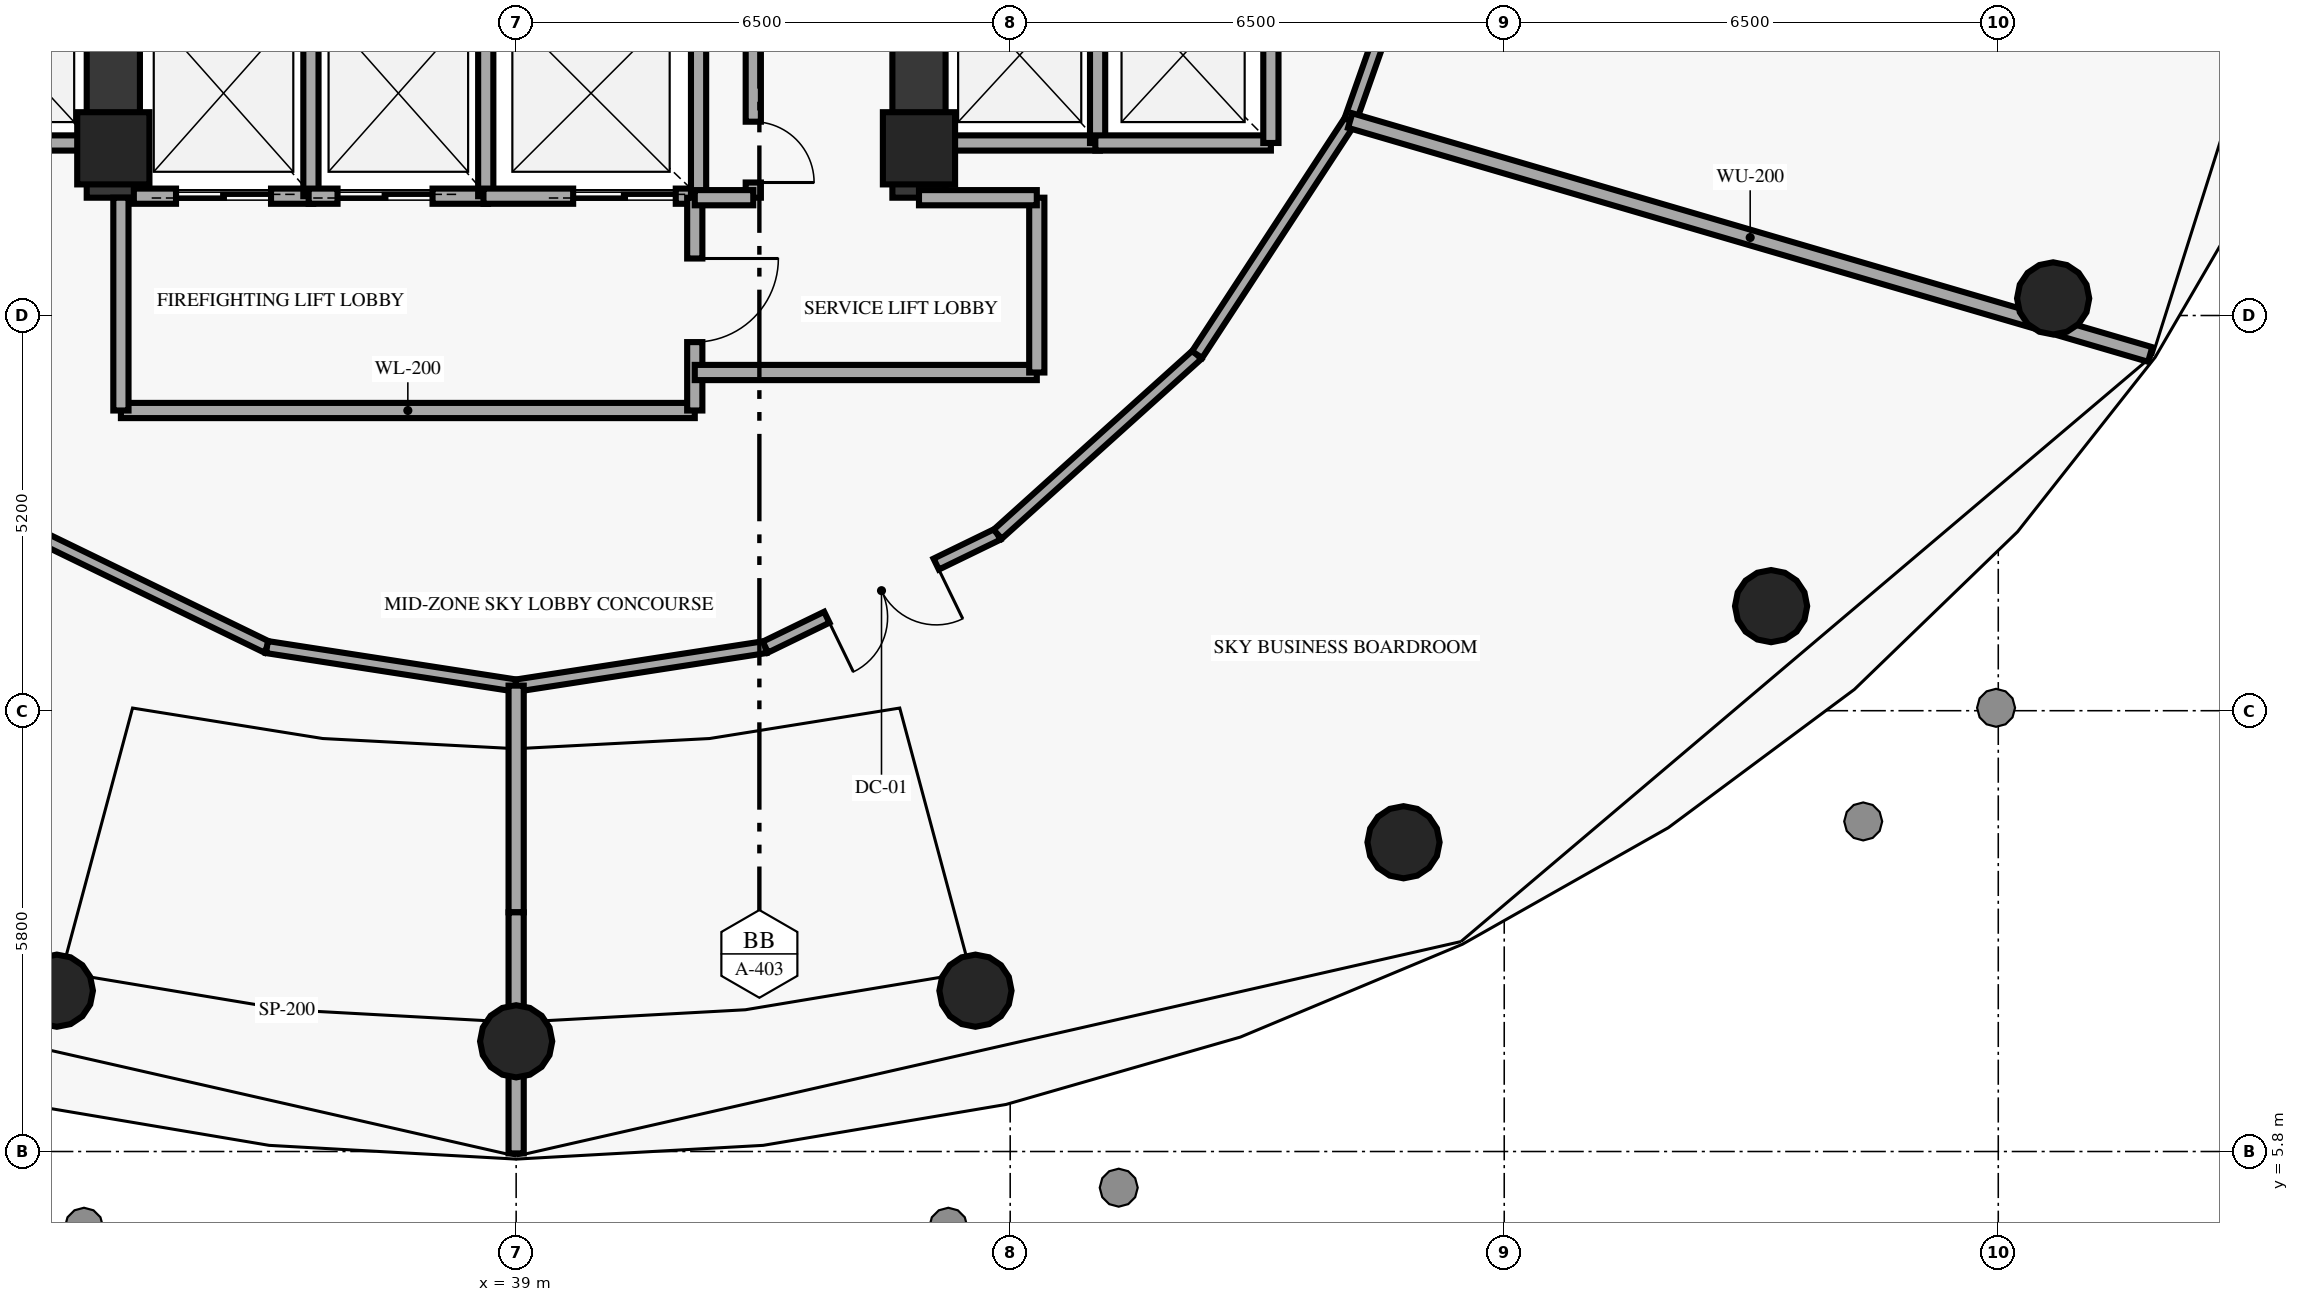
"""IFC4 building model, lengths in metres.
Left out: names, types, materials, properties, quantities, classifications, styles, units other than length and angle.
Written with IfcOpenShell. Run it as: python <this file> out.ifc"""

import sys

from ifc_helpers import new_model, si_unit, direction, frame, frame_2d, origin, origin_2d, place, context, subcontext, project, spatial, rectangle, circle, extrude, element, fill, save


model = new_model("IFC4")
c1 = context("Model", 3, precision=1e-05, world=origin(), true_north=direction((0.0, 1.0)))
c2 = subcontext(c1, "Body", "Model", "MODEL_VIEW")
j1 = project(units=[si_unit("LENGTHUNIT", "METRE"), si_unit("PLANEANGLEUNIT", "RADIAN")], contexts=[c1])
p1 = place(None, origin())
s1 = spatial("IfcSite", under=j1, at=p1, CompositionType="ELEMENT")
p2 = place(p1, origin())
s2 = spatial("IfcBuilding", under=s1, at=p2, CompositionType="ELEMENT")
p3 = place(p2, frame((0.0, 0.0, 113.25)))
s3 = spatial("IfcBuildingStorey", under=s2, at=p3, CompositionType="ELEMENT", Elevation=113.25)
for number, where, z_axis, x_axis in (
    (1, (33.7, 19.0, 0.0), (0.0, 0.0, 1.0), (1.0, 0.0, 0.0)),
    (2, (44.3, 19.0, 0.0), (0.0, 0.0, 1.0), (1.0, 0.0, 0.0)),
):
    element("IfcColumn", number, at=place(p3, frame(where, z_axis=z_axis, x_axis=x_axis)), inside=s3, PredefinedType="PILASTER", context=c2, shape_type="SweptSolid", body=[
        extrude(rectangle(XDim=0.95, YDim=0.95, at=origin_2d()), origin(), (0.0, 0.0, 1.0), 4.75),
    ])
for number, where, z_axis, x_axis in (
    (3, (32.957, 7.916, 0.0), (0.0, 0.0, 1.0), (1.0, 0.0, 0.0)),
    (4, (39.0, 7.25, 0.0), (0.0, 0.0, 1.0), (1.0, 0.0, 0.0)),
    (5, (45.043, 7.916, 0.0), (0.0, 0.0, 1.0), (1.0, 0.0, 0.0)),
    (6, (50.675, 9.869, 0.0), (0.0, 0.0, 1.0), (1.0, 0.0, 0.0)),
    (7, (55.511, 12.976, 0.0), (0.0, 0.0, 1.0), (1.0, 0.0, 0.0)),
    (8, (59.222, 17.025, 0.0), (0.0, 0.0, 1.0), (1.0, 0.0, 0.0)),
):
    element("IfcColumn", number, at=place(p3, frame(where, z_axis=z_axis, x_axis=x_axis)), inside=s3, PredefinedType="COLUMN", context=c2, shape_type="SweptSolid", body=[
        extrude(circle(Radius=0.475, at=origin_2d()), origin(), (0.0, 0.0, 1.0), 4.75),
    ])
for number, where, z_axis, x_axis in (
    (9, (33.7, 18.35, 0.0), (0.0, 0.0, 1.0), (0.0, 1.0, 0.0)),
    (10, (44.3, 18.35, 0.0), (0.0, 0.0, 1.0), (0.0, 1.0, 0.0)),
):
    element("IfcWall", number, at=place(p3, frame(where, z_axis=z_axis, x_axis=x_axis)), inside=s3, PredefinedType="SHEAR", context=c2, shape_type="SweptSolid", body=[
        extrude(rectangle(XDim=2.95, YDim=0.7, at=frame_2d((1.475, 0.0))), origin(), (0.0, 0.0, 1.0), 4.75),
    ])
for number, where, z_axis, x_axis in (
    (11, (31.32, 19.07, 0.0), (0.0, 0.0, 1.0), (1.0, 0.0, 0.0)),
    (12, (44.57, 19.07, 0.0), (0.0, 0.0, 1.0), (1.0, 0.0, 0.0)),
):
    element("IfcWall", number, at=place(p3, frame(where, z_axis=z_axis, x_axis=x_axis)), inside=s3, PredefinedType="SOLIDWALL", context=c2, shape_type="SweptSolid", body=[
        extrude(rectangle(XDim=2.11, YDim=0.2, at=frame_2d((1.055, 0.0))), origin(), (0.0, 0.0, 1.0), 4.75),
    ])
for number, where, z_axis, x_axis in (
    (13, (46.65, 19.07, 0.0), (0.0, 0.0, 1.0), (0.0, 1.0, 0.0)),
    (14, (46.62, 19.07, 0.0), (0.0, 0.0, 1.0), (1.0, 0.0, 0.0)),
    (15, (48.93, 19.07, 0.0), (0.0, 0.0, 1.0), (0.0, 1.0, 0.0)),
):
    element("IfcWall", number, at=place(p3, frame(where, z_axis=z_axis, x_axis=x_axis)), inside=s3, PredefinedType="SOLIDWALL", context=c2, shape_type="SweptSolid", body=[
        extrude(rectangle(XDim=2.31, YDim=0.2, at=frame_2d((1.155, 0.0))), origin(), (0.0, 0.0, 1.0), 4.75),
    ])
p4 = place(p3, frame((33.97, 18.37, 0.0), z_axis=(0.0, 0.0, 1.0), x_axis=(1.0, 0.0, 0.0)))
e16 = element("IfcWall", 16, at=p4, inside=s3, PredefinedType="SOLIDWALL", context=c2, shape_type="SweptSolid", body=[
    extrude(rectangle(XDim=2.36, YDim=0.2, at=frame_2d((1.18, 0.0))), origin(), (0.0, 0.0, 1.0), 4.75),
])
p5 = place(p4, frame((0.555, 0.0, 0.0)))
e17 = element("IfcOpeningElement", 17, at=p5, cuts=e16, PredefinedType="OPENING", context=c2, shape_type="SweptSolid", body=[
    extrude(rectangle(XDim=1.25, YDim=2.2, at=frame_2d((0.625, 1.1))), frame((0.0, 0.11, 0.0), z_axis=(0.0, -1.0, 0.0), x_axis=(1.0, 0.0, 0.0)), (0.0, 0.0, 1.0), 0.22),
])
p6 = place(p3, frame((36.3, 18.37, 0.0), z_axis=(0.0, 0.0, 1.0), x_axis=(0.0, 1.0, 0.0)))
e18 = element("IfcWall", 18, at=p6, inside=s3, PredefinedType="SOLIDWALL", context=c2, shape_type="SweptSolid", body=[
    extrude(rectangle(XDim=2.71, YDim=0.2, at=frame_2d((1.355, 0.0))), origin(), (0.0, 0.0, 1.0), 4.75),
])
p7 = place(p3, frame((36.27, 18.37, 0.0), z_axis=(0.0, 0.0, 1.0), x_axis=(1.0, 0.0, 0.0)))
e19 = element("IfcWall", 19, at=p7, inside=s3, PredefinedType="SOLIDWALL", context=c2, shape_type="SweptSolid", body=[
    extrude(rectangle(XDim=2.36, YDim=0.2, at=frame_2d((1.18, 0.0))), origin(), (0.0, 0.0, 1.0), 4.75),
])
p8 = place(p7, frame((0.38, 0.0, 0.0)))
e20 = element("IfcOpeningElement", 20, at=p8, cuts=e19, PredefinedType="OPENING", context=c2, shape_type="SweptSolid", body=[
    extrude(rectangle(XDim=1.25, YDim=2.2, at=frame_2d((0.625, 1.1))), frame((0.0, 0.11, 0.0), z_axis=(0.0, -1.0, 0.0), x_axis=(1.0, 0.0, 0.0)), (0.0, 0.0, 1.0), 0.22),
])
p9 = place(p3, frame((38.6, 18.37, 0.0), z_axis=(0.0, 0.0, 1.0), x_axis=(0.0, 1.0, 0.0)))
e21 = element("IfcWall", 21, at=p9, inside=s3, PredefinedType="SOLIDWALL", context=c2, shape_type="SweptSolid", body=[
    extrude(rectangle(XDim=2.71, YDim=0.2, at=frame_2d((1.355, 0.0))), origin(), (0.0, 0.0, 1.0), 4.75),
])
p10 = place(p3, frame((38.57, 18.37, 0.0), z_axis=(0.0, 0.0, 1.0), x_axis=(1.0, 0.0, 0.0)))
e22 = element("IfcWall", 22, at=p10, inside=s3, PredefinedType="SOLIDWALL", context=c2, shape_type="SweptSolid", body=[
    extrude(rectangle(XDim=2.83, YDim=0.2, at=frame_2d((1.415, 0.0))), origin(), (0.0, 0.0, 1.0), 4.75),
])
p11 = place(p10, frame((1.18, 0.0, 0.0)))
e23 = element("IfcOpeningElement", 23, at=p11, cuts=e22, PredefinedType="OPENING", context=c2, shape_type="SweptSolid", body=[
    extrude(rectangle(XDim=1.35, YDim=2.18, at=frame_2d((0.675, 1.09))), frame((0.0, 0.11, 0.0), z_axis=(0.0, -1.0, 0.0), x_axis=(1.0, 0.0, 0.0)), (0.0, 0.0, 1.0), 0.22),
])
p12 = place(p3, frame((41.4, 18.37, 0.0), z_axis=(0.0, 0.0, 1.0), x_axis=(0.0, 1.0, 0.0)))
e24 = element("IfcWall", 24, at=p12, inside=s3, PredefinedType="SOLIDWALL", context=c2, shape_type="SweptSolid", body=[
    extrude(rectangle(XDim=2.71, YDim=0.2, at=frame_2d((1.355, 0.0))), origin(), (0.0, 0.0, 1.0), 4.75),
])
p13 = place(p3, frame((33.8, 15.55, 0.0), z_axis=(0.0, 0.0, 1.0), x_axis=(1.0, 0.0, 0.0)))
e25 = element("IfcWall", 25, at=p13, inside=s3, PredefinedType="SOLIDWALL", context=c2, shape_type="SweptSolid", body=[
    extrude(rectangle(XDim=7.55, YDim=0.2, at=frame_2d((3.775, 0.0))), origin(), (0.0, 0.0, 1.0), 4.75),
])
p14 = place(p3, frame((33.8, 15.55, 0.0), z_axis=(0.0, 0.0, 1.0), x_axis=(0.0, 1.0, 0.0)))
e26 = element("IfcWall", 26, at=p14, inside=s3, PredefinedType="SOLIDWALL", context=c2, shape_type="SweptSolid", body=[
    extrude(rectangle(XDim=2.8, YDim=0.2, at=frame_2d((1.4, 0.0))), origin(), (0.0, 0.0, 1.0), 4.75),
])
p15 = place(p3, frame((41.35, 15.55, 0.0), z_axis=(0.0, 0.0, 1.0), x_axis=(0.0, 1.0, 0.0)))
e27 = element("IfcWall", 27, at=p15, inside=s3, PredefinedType="SOLIDWALL", context=c2, shape_type="SweptSolid", body=[
    extrude(rectangle(XDim=2.8, YDim=0.2, at=frame_2d((1.4, 0.0))), origin(), (0.0, 0.0, 1.0), 4.75),
])
p16 = place(p15, frame((0.9, 0.0, 0.0)))
e28 = element("IfcOpeningElement", 28, at=p16, cuts=e27, PredefinedType="OPENING", context=c2, shape_type="SweptSolid", body=[
    extrude(rectangle(XDim=1.1, YDim=2.15, at=frame_2d((0.55, 1.075))), frame((0.0, 0.11, 0.0), z_axis=(0.0, -1.0, 0.0), x_axis=(1.0, 0.0, 0.0)), (0.0, 0.0, 1.0), 0.22),
])
p17 = place(p3, frame((41.35, 16.05, 0.0), z_axis=(0.0, 0.0, 1.0), x_axis=(1.0, 0.0, 0.0)))
e29 = element("IfcWall", 29, at=p17, inside=s3, PredefinedType="SOLIDWALL", context=c2, shape_type="SweptSolid", body=[
    extrude(rectangle(XDim=4.5, YDim=0.2, at=frame_2d((2.25, 0.0))), origin(), (0.0, 0.0, 1.0), 4.75),
])
p18 = place(p3, frame((45.85, 16.05, 0.0), z_axis=(0.0, 0.0, 1.0), x_axis=(0.0, 1.0, 0.0)))
e30 = element("IfcWall", 30, at=p18, inside=s3, PredefinedType="SOLIDWALL", context=c2, shape_type="SweptSolid", body=[
    extrude(rectangle(XDim=2.3, YDim=0.2, at=frame_2d((1.15, 0.0))), origin(), (0.0, 0.0, 1.0), 4.75),
])
p19 = place(p3, frame((44.3, 18.35, 0.0), z_axis=(0.0, 0.0, 1.0), x_axis=(1.0, 0.0, 0.0)))
e31 = element("IfcWall", 31, at=p19, inside=s3, PredefinedType="SOLIDWALL", context=c2, shape_type="SweptSolid", body=[
    extrude(rectangle(XDim=1.55, YDim=0.2, at=frame_2d((0.775, 0.0))), origin(), (0.0, 0.0, 1.0), 4.75),
])
p20 = place(p3, frame((42.12, 18.35, 0.0), z_axis=(0.0, 0.0, 1.0), x_axis=(0.0, 1.0, 0.0)))
e32 = element("IfcWall", 32, at=p20, inside=s3, PredefinedType="SOLIDWALL", context=c2, shape_type="SweptSolid", body=[
    extrude(rectangle(XDim=2.95, YDim=0.2, at=frame_2d((1.475, 0.0))), origin(), (0.0, 0.0, 1.0), 4.75),
])
p21 = place(p20, frame((0.2, 0.0, 0.0)))
e33 = element("IfcOpeningElement", 33, at=p21, cuts=e32, PredefinedType="OPENING", context=c2, shape_type="SweptSolid", body=[
    extrude(rectangle(XDim=0.8, YDim=2.05, at=frame_2d((0.4, 1.025))), frame((0.0, 0.11, 0.0), z_axis=(0.0, -1.0, 0.0), x_axis=(1.0, 0.0, 0.0)), (0.0, 0.0, 1.0), 0.22),
])
p22 = place(p3, frame((41.35, 18.35, 0.0), z_axis=(0.0, 0.0, 1.0), x_axis=(1.0, 0.0, 0.0)))
e34 = element("IfcWall", 34, at=p22, inside=s3, PredefinedType="SOLIDWALL", context=c2, shape_type="SweptSolid", body=[
    extrude(rectangle(XDim=0.77, YDim=0.2, at=frame_2d((0.385, 0.0))), origin(), (0.0, 0.0, 1.0), 4.75),
])
p23 = place(p3, frame((32.665, 13.922, 0.0), z_axis=(0.0, 0.0, 1.0), x_axis=(0.899414545514, -0.437096642995, 0.0)))
e35 = element("IfcWall", 35, at=p23, inside=s3, PredefinedType="PARTITIONING", context=c2, shape_type="SweptSolid", body=[
    extrude(rectangle(XDim=3.398, YDim=0.16, at=frame_2d((1.699, 0.0))), origin(), (0.0, 0.0, 1.0), 4.75),
])
for number, where, z_axis, x_axis in (
    (36, (35.721, 12.437, 0.0), (0.0, 0.0, 1.0), (0.988, -0.153, 0.0)),
    (37, (39.0, 11.93, 0.0), (0.0, 0.0, 1.0), (0.988, 0.153, 0.0)),
):
    element("IfcWall", number, at=place(p3, frame(where, z_axis=z_axis, x_axis=x_axis)), inside=s3, PredefinedType="PARTITIONING", context=c2, shape_type="SweptSolid", body=[
        extrude(rectangle(XDim=3.318, YDim=0.16, at=frame_2d((1.659, 0.0))), origin(), (0.0, 0.0, 1.0), 4.75),
    ])
p24 = place(p3, frame((45.335, 13.922, 0.0), z_axis=(0.0, 0.0, 1.0), x_axis=(-0.899414545514, -0.437096642995, 0.0)))
e38 = element("IfcWall", 38, at=p24, inside=s3, PredefinedType="PARTITIONING", context=c2, shape_type="SweptSolid", body=[
    extrude(rectangle(XDim=3.398, YDim=0.16, at=frame_2d((1.699, 0.0))), origin(), (0.0, 0.0, 1.0), 4.75),
])
p25 = place(p24, frame((0.899, 0.0, 0.0)))
e39 = element("IfcOpeningElement", 39, at=p25, cuts=e38, PredefinedType="OPENING", context=c2, shape_type="SweptSolid", body=[
    extrude(rectangle(XDim=1.6, YDim=2.2, at=frame_2d((0.8, 1.1))), frame((0.0, 0.09, 0.0), z_axis=(0.0, -1.0, 0.0), x_axis=(1.0, 0.0, 0.0)), (0.0, 0.0, 1.0), 0.18),
])
p26 = place(p3, frame((45.335, 13.922, 0.0), z_axis=(0.0, 0.0, 1.0), x_axis=(0.743129101656, 0.66914806902, 0.0)))
e40 = element("IfcWall", 40, at=p26, inside=s3, PredefinedType="PARTITIONING", context=c2, shape_type="SweptSolid", body=[
    extrude(rectangle(XDim=3.531, YDim=0.16, at=frame_2d((1.766, 0.0))), origin(), (0.0, 0.0, 1.0), 4.75),
])
p27 = place(p3, frame((47.959, 16.285, 0.0), z_axis=(0.0, 0.0, 1.0), x_axis=(0.547252937869, 0.836967276537, 0.0)))
e41 = element("IfcWall", 41, at=p27, inside=s3, PredefinedType="PARTITIONING", context=c2, shape_type="SweptSolid", body=[
    extrude(rectangle(XDim=3.68, YDim=0.16, at=frame_2d((1.84, 0.0))), origin(), (0.0, 0.0, 1.0), 4.75),
])
p28 = place(p3, frame((49.973, 19.365, 0.0), z_axis=(0.0, 0.0, 1.0), x_axis=(0.332705930675, 0.943030627124, 0.0)))
e42 = element("IfcWall", 42, at=p28, inside=s3, PredefinedType="PARTITIONING", context=c2, shape_type="SweptSolid", body=[
    extrude(rectangle(XDim=3.802, YDim=0.16, at=frame_2d((1.901, 0.0))), origin(), (0.0, 0.0, 1.0), 4.75),
])
p29 = place(p3, frame((39.0, 11.93, 0.0), z_axis=(0.0, 0.0, 1.0), x_axis=(0.0, -1.0, 0.0)))
e43 = element("IfcWall", 43, at=p29, inside=s3, PredefinedType="PARTITIONING", context=c2, shape_type="SweptSolid", body=[
    extrude(rectangle(XDim=2.983, YDim=0.2, at=frame_2d((1.491, 0.0))), origin(), (0.0, 0.0, 1.0), 4.75),
])
p30 = place(p3, frame((39.0, 8.947, 0.0), z_axis=(0.0, 0.0, 1.0), x_axis=(0.0, -1.0, 0.0)))
e44 = element("IfcWall", 44, at=p30, inside=s3, PredefinedType="PARTITIONING", context=c2, shape_type="SweptSolid", body=[
    extrude(rectangle(XDim=1.712, YDim=0.2, at=frame_2d((0.856, 0.0))), origin(), (0.0, 0.0, 1.0), 3.89),
])
p31 = place(p3, frame((39.0, 7.235, 0.0), z_axis=(0.0, 0.0, 1.0), x_axis=(0.0, -1.0, 0.0)))
e45 = element("IfcWall", 45, at=p31, inside=s3, PredefinedType="PARTITIONING", context=c2, shape_type="SweptSolid", body=[
    extrude(rectangle(XDim=1.46, YDim=0.2, at=frame_2d((0.73, 0.0))), origin(), (0.0, 0.0, 1.0), 4.75),
])
p32 = place(p3, frame((49.973, 19.365, 0.0), z_axis=(0.0, 0.0, 1.0), x_axis=(0.959809539565, -0.28065218289, 0.0)))
e46 = element("IfcWall", 46, at=p32, inside=s3, PredefinedType="PARTITIONING", context=c2, shape_type="SweptSolid", body=[
    extrude(rectangle(XDim=10.967, YDim=0.2, at=frame_2d((5.483, 0.0))), origin(), (0.0, 0.0, 1.0), 4.75),
])
p33 = place(p5, origin())
e47 = element("IfcDoor", 47, at=p33, inside=s3, OperationType="DOUBLE_DOOR_SLIDING", PredefinedType="DOOR", context=c2, shape_type="SweptSolid", body=[
    extrude(rectangle(XDim=1.25, YDim=2.2, at=frame_2d((0.625, 1.1))), frame((0.0, 0.025, 0.0), z_axis=(0.0, -1.0, 0.0), x_axis=(1.0, 0.0, 0.0)), (0.0, 0.0, 1.0), 0.05),
])
fill(e17, e47)
p34 = place(p8, origin())
e48 = element("IfcDoor", 48, at=p34, inside=s3, OperationType="DOUBLE_DOOR_SLIDING", PredefinedType="DOOR", context=c2, shape_type="SweptSolid", body=[
    extrude(rectangle(XDim=1.25, YDim=2.2, at=frame_2d((0.625, 1.1))), frame((0.0, 0.025, 0.0), z_axis=(0.0, -1.0, 0.0), x_axis=(1.0, 0.0, 0.0)), (0.0, 0.0, 1.0), 0.05),
])
fill(e20, e48)
p35 = place(p11, origin())
e49 = element("IfcDoor", 49, at=p35, inside=s3, OperationType="DOUBLE_DOOR_SLIDING", PredefinedType="DOOR", context=c2, shape_type="SweptSolid", body=[
    extrude(rectangle(XDim=1.35, YDim=2.18, at=frame_2d((0.675, 1.09))), frame((0.0, 0.025, 0.0), z_axis=(0.0, -1.0, 0.0), x_axis=(1.0, 0.0, 0.0)), (0.0, 0.0, 1.0), 0.05),
])
fill(e23, e49)
p36 = place(p16, origin())
e50 = element("IfcDoor", 50, at=p36, inside=s3, OperationType="SINGLE_SWING_RIGHT", PredefinedType="DOOR", context=c2, shape_type="SweptSolid", body=[
    extrude(rectangle(XDim=1.1, YDim=2.15, at=frame_2d((0.55, 1.075))), frame((0.0, 0.025, 0.0), z_axis=(0.0, -1.0, 0.0), x_axis=(1.0, 0.0, 0.0)), (0.0, 0.0, 1.0), 0.05),
])
fill(e28, e50)
p37 = place(p21, origin())
e51 = element("IfcDoor", 51, at=p37, inside=s3, OperationType="SINGLE_SWING_LEFT", PredefinedType="DOOR", context=c2, shape_type="SweptSolid", body=[
    extrude(rectangle(XDim=0.8, YDim=2.05, at=frame_2d((0.4, 1.025))), frame((0.0, 0.025, 0.0), z_axis=(0.0, -1.0, 0.0), x_axis=(1.0, 0.0, 0.0)), (0.0, 0.0, 1.0), 0.05),
])
fill(e33, e51)
p38 = place(p25, origin())
e52 = element("IfcDoor", 52, at=p38, inside=s3, OperationType="DOUBLE_DOOR_SINGLE_SWING", PredefinedType="DOOR", context=c2, shape_type="SweptSolid", body=[
    extrude(rectangle(XDim=1.6, YDim=2.2, at=frame_2d((0.8, 1.1))), frame((0.0, 0.025, 0.0), z_axis=(0.0, -1.0, 0.0), x_axis=(1.0, 0.0, 0.0)), (0.0, 0.0, 1.0), 0.05),
])
fill(e39, e52)
save(model, sys.argv[1])
